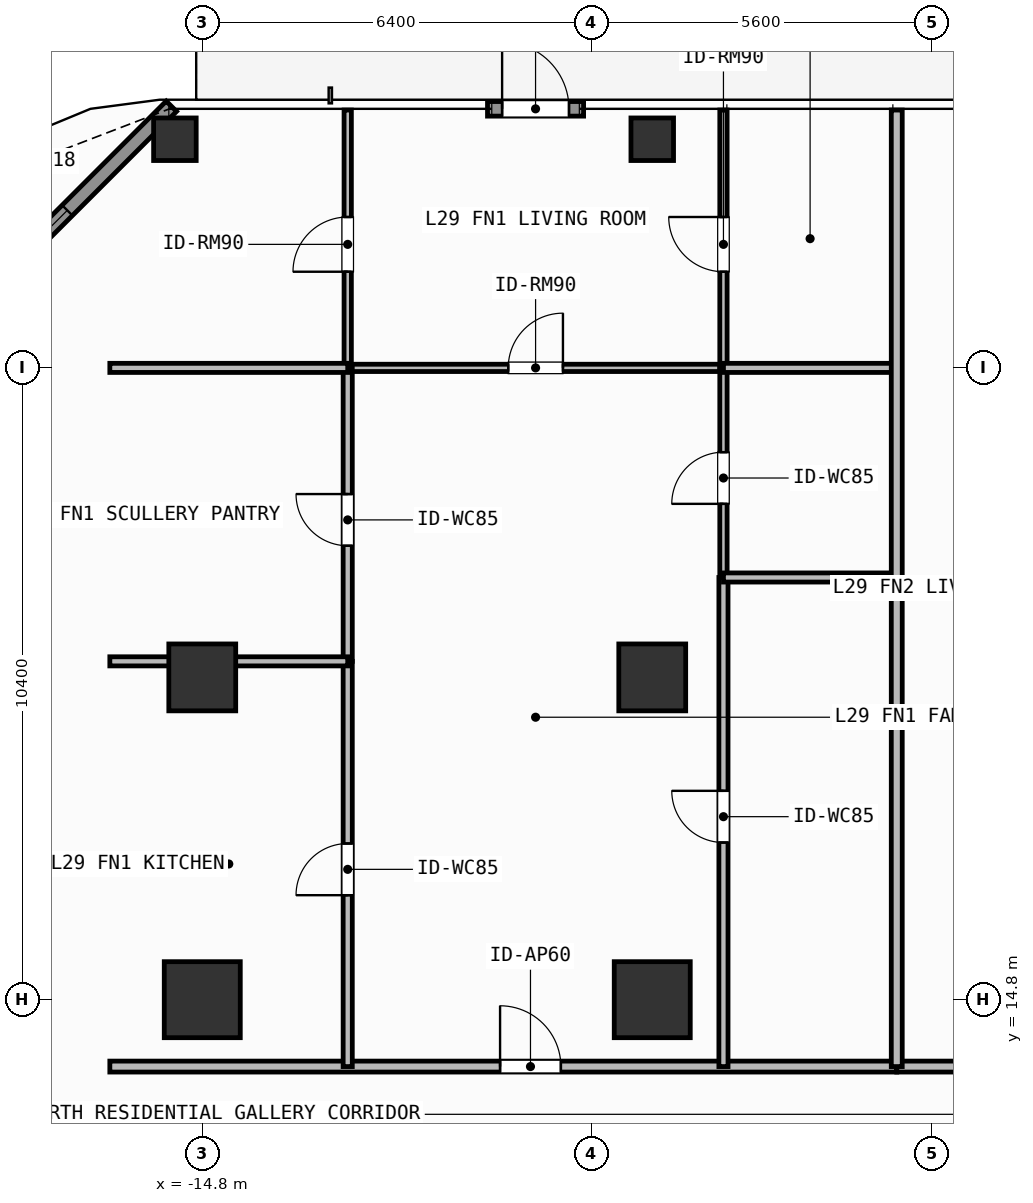
"""IFC4 building model, lengths in metres.
Left out: names, types, materials, properties, quantities, classifications, styles, units other than length and angle.
Written with IfcOpenShell. Run it as: python <this file> out.ifc"""

import sys

from ifc_helpers import new_model, si_unit, direction, frame, frame_2d, origin, origin_2d, place, context, subcontext, project, spatial, rectangle, hollow_rectangle, extrude, element, fill, save


model = new_model("IFC4")
c1 = context("Model", 3, precision=1e-05, world=origin(), true_north=direction((0.0, 1.0)))
c2 = subcontext(c1, "Body", "Model", "MODEL_VIEW")
j1 = project(units=[si_unit("LENGTHUNIT", "METRE"), si_unit("PLANEANGLEUNIT", "RADIAN")], contexts=[c1])
p1 = place(None, origin())
s1 = spatial("IfcSite", under=j1, at=p1, CompositionType="ELEMENT")
p2 = place(p1, origin())
s2 = spatial("IfcBuilding", under=s1, at=p2, CompositionType="ELEMENT")
p3 = place(p2, frame((0.0, 0.0, 117.3)))
s3 = spatial("IfcBuildingStorey", under=s2, at=p3, CompositionType="ELEMENT", Elevation=117.3)
for number, where, z_axis, x_axis in (
    (1, (-14.8, 14.8, 0.0), (0.0, 0.0, 1.0), (1.0, 0.0, 0.0)),
    (2, (-7.4, 14.8, 0.0), (0.0, 0.0, 1.0), (1.0, 0.0, 0.0)),
):
    element("IfcColumn", number, at=place(p3, frame(where, z_axis=z_axis, x_axis=x_axis)), inside=s3, PredefinedType="COLUMN", context=c2, shape_type="SweptSolid", body=[
        extrude(rectangle(XDim=1.25, YDim=1.25, at=origin_2d()), origin(), (0.0, 0.0, 1.0), 3.9),
    ])
for number, where, z_axis, x_axis in (
    (3, (-14.8, 20.1, 0.0), (0.0, 0.0, 1.0), (1.0, 0.0, 0.0)),
    (4, (-7.4, 20.1, 0.0), (0.0, 0.0, 1.0), (1.0, 0.0, 0.0)),
):
    element("IfcColumn", number, at=place(p3, frame(where, z_axis=z_axis, x_axis=x_axis)), inside=s3, PredefinedType="COLUMN", context=c2, shape_type="SweptSolid", body=[
        extrude(rectangle(XDim=1.1, YDim=1.1, at=origin_2d()), origin(), (0.0, 0.0, 1.0), 3.9),
    ])
for number, where, z_axis, x_axis in (
    (5, (-15.25, 28.95, 0.0), (0.0, 0.0, 1.0), (1.0, 0.0, 0.0)),
    (6, (-7.4, 28.95, 0.0), (0.0, 0.0, 1.0), (1.0, 0.0, 0.0)),
):
    element("IfcColumn", number, at=place(p3, frame(where, z_axis=z_axis, x_axis=x_axis)), inside=s3, PredefinedType="COLUMN", context=c2, shape_type="SweptSolid", body=[
        extrude(hollow_rectangle(XDim=0.7, YDim=0.7, WallThickness=0.032, at=origin_2d()), origin(), (0.0, 0.0, 1.0), 3.9),
    ])
p4 = place(p3, frame((-10.109, 29.45, 0.0), z_axis=(0.0, 0.0, 1.0), x_axis=(1.0, 0.0, 0.0)))
e7 = element("IfcWall", 7, at=p4, inside=s3, PredefinedType="SOLIDWALL", context=c2, shape_type="SweptSolid", body=[
    extrude(rectangle(XDim=1.58, YDim=0.24, at=frame_2d((0.79, 0.0))), origin(), (0.0, 0.0, 1.0), 3.68),
])
p5 = place(p4, frame((0.24, 0.0, 0.0)))
e8 = element("IfcOpeningElement", 8, at=p5, cuts=e7, PredefinedType="OPENING", context=c2, shape_type="SweptSolid", body=[
    extrude(rectangle(XDim=1.1, YDim=2.2, at=frame_2d((0.55, 1.1))), frame((0.0, 0.13, 0.0), z_axis=(0.0, -1.0, 0.0), x_axis=(1.0, 0.0, 0.0)), (0.0, 0.0, 1.0), 0.26),
])
p6 = place(p3, frame((-19.792, 25.008, 0.0), z_axis=(0.0, 0.0, 1.0), x_axis=(0.707106781187, 0.707106781187, 0.0)))
e9 = element("IfcWall", 9, at=p6, inside=s3, PredefinedType="SOLIDWALL", context=c2, shape_type="SweptSolid", body=[
    extrude(rectangle(XDim=6.343, YDim=0.24, at=frame_2d((3.171, 0.0))), origin(), (0.0, 0.0, 1.0), 3.68),
])
p7 = place(p6, frame((2.421, 0.0, 0.8)))
e10 = element("IfcOpeningElement", 10, at=p7, cuts=e9, PredefinedType="OPENING", context=c2, shape_type="SweptSolid", body=[
    extrude(rectangle(XDim=1.5, YDim=1.85, at=frame_2d((0.75, 0.925))), frame((0.0, 0.13, 0.0), z_axis=(0.0, -1.0, 0.0), x_axis=(1.0, 0.0, 0.0)), (0.0, 0.0, 1.0), 0.26),
])
p8 = place(p3, frame((-16.32, 13.7, 0.0), z_axis=(0.0, 0.0, 1.0), x_axis=(1.0, 0.0, 0.0)))
e11 = element("IfcWall", 11, at=p8, inside=s3, PredefinedType="PARTITIONING", context=c2, shape_type="SweptSolid", body=[
    extrude(rectangle(XDim=12.941, YDim=0.18, at=frame_2d((6.471, 0.0))), origin(), (0.0, 0.0, 1.0), 3.68),
])
p9 = place(p8, frame((6.417, 0.0, 0.0)))
e12 = element("IfcOpeningElement", 12, at=p9, cuts=e11, PredefinedType="OPENING", context=c2, shape_type="SweptSolid", body=[
    extrude(rectangle(XDim=1.0, YDim=2.2, at=frame_2d((0.5, 1.1))), frame((0.0, 0.1, 0.0), z_axis=(0.0, -1.0, 0.0), x_axis=(1.0, 0.0, 0.0)), (0.0, 0.0, 1.0), 0.2),
])
p10 = place(p3, frame((-12.408, 25.19, 0.0), z_axis=(0.0, 0.0, 1.0), x_axis=(1.0, 0.0, 0.0)))
e13 = element("IfcWall", 13, at=p10, inside=s3, PredefinedType="PARTITIONING", context=c2, shape_type="SweptSolid", body=[
    extrude(rectangle(XDim=6.179, YDim=0.12, at=frame_2d((3.089, 0.0))), origin(), (0.0, 0.0, 1.0), 3.68),
])
p11 = place(p10, frame((2.639, 0.0, 0.0)))
e14 = element("IfcOpeningElement", 14, at=p11, cuts=e13, PredefinedType="OPENING", context=c2, shape_type="SweptSolid", body=[
    extrude(rectangle(XDim=0.9, YDim=2.1, at=frame_2d((0.45, 1.05))), frame((0.0, 0.07, 0.0), z_axis=(0.0, -1.0, 0.0), x_axis=(1.0, 0.0, 0.0)), (0.0, 0.0, 1.0), 0.14),
])
p12 = place(p3, frame((-12.408, 13.7, 0.0), z_axis=(0.0, 0.0, 1.0), x_axis=(0.0, 1.0, 0.0)))
e15 = element("IfcWall", 15, at=p12, inside=s3, PredefinedType="PARTITIONING", context=c2, shape_type="SweptSolid", body=[
    extrude(rectangle(XDim=6.664, YDim=0.15, at=frame_2d((3.332, 0.0))), origin(), (0.0, 0.0, 1.0), 3.68),
])
p13 = place(p12, frame((2.818, 0.0, 0.0)))
e16 = element("IfcOpeningElement", 16, at=p13, cuts=e15, PredefinedType="OPENING", context=c2, shape_type="SweptSolid", body=[
    extrude(rectangle(XDim=0.85, YDim=2.1, at=frame_2d((0.425, 1.05))), frame((0.0, 0.085, 0.0), z_axis=(0.0, -1.0, 0.0), x_axis=(1.0, 0.0, 0.0)), (0.0, 0.0, 1.0), 0.17),
])
p14 = place(p3, frame((-12.408, 20.364, 0.0), z_axis=(0.0, 0.0, 1.0), x_axis=(0.0, 1.0, 0.0)))
e17 = element("IfcWall", 17, at=p14, inside=s3, PredefinedType="PARTITIONING", context=c2, shape_type="SweptSolid", body=[
    extrude(rectangle(XDim=4.826, YDim=0.15, at=frame_2d((2.413, 0.0))), origin(), (0.0, 0.0, 1.0), 3.68),
])
p15 = place(p14, frame((1.901, 0.0, 0.0)))
e18 = element("IfcOpeningElement", 18, at=p15, cuts=e17, PredefinedType="OPENING", context=c2, shape_type="SweptSolid", body=[
    extrude(rectangle(XDim=0.85, YDim=2.1, at=frame_2d((0.425, 1.05))), frame((0.0, 0.085, 0.0), z_axis=(0.0, -1.0, 0.0), x_axis=(1.0, 0.0, 0.0)), (0.0, 0.0, 1.0), 0.17),
])
p16 = place(p3, frame((-12.408, 25.19, 0.0), z_axis=(0.0, 0.0, 1.0), x_axis=(0.0, 1.0, 0.0)))
e19 = element("IfcWall", 19, at=p16, inside=s3, PredefinedType="PARTITIONING", context=c2, shape_type="SweptSolid", body=[
    extrude(rectangle(XDim=4.24, YDim=0.12, at=frame_2d((2.12, 0.0))), origin(), (0.0, 0.0, 1.0), 3.68),
])
p17 = place(p16, frame((1.581, 0.0, 0.0)))
e20 = element("IfcOpeningElement", 20, at=p17, cuts=e19, PredefinedType="OPENING", context=c2, shape_type="SweptSolid", body=[
    extrude(rectangle(XDim=0.9, YDim=2.1, at=frame_2d((0.45, 1.05))), frame((0.0, 0.07, 0.0), z_axis=(0.0, -1.0, 0.0), x_axis=(1.0, 0.0, 0.0)), (0.0, 0.0, 1.0), 0.14),
])
p18 = place(p3, frame((-6.229, 13.7, 0.0), z_axis=(0.0, 0.0, 1.0), x_axis=(0.0, 1.0, 0.0)))
e21 = element("IfcWall", 21, at=p18, inside=s3, PredefinedType="PARTITIONING", context=c2, shape_type="SweptSolid", body=[
    extrude(rectangle(XDim=8.043, YDim=0.15, at=frame_2d((4.021, 0.0))), origin(), (0.0, 0.0, 1.0), 3.68),
])
p19 = place(p18, frame((3.685, 0.0, 0.0)))
e22 = element("IfcOpeningElement", 22, at=p19, cuts=e21, PredefinedType="OPENING", context=c2, shape_type="SweptSolid", body=[
    extrude(rectangle(XDim=0.85, YDim=2.1, at=frame_2d((0.425, 1.05))), frame((0.0, 0.085, 0.0), z_axis=(0.0, -1.0, 0.0), x_axis=(1.0, 0.0, 0.0)), (0.0, 0.0, 1.0), 0.17),
])
p20 = place(p3, frame((-6.229, 21.743, 0.0), z_axis=(0.0, 0.0, 1.0), x_axis=(0.0, 1.0, 0.0)))
e23 = element("IfcWall", 23, at=p20, inside=s3, PredefinedType="PARTITIONING", context=c2, shape_type="SweptSolid", body=[
    extrude(rectangle(XDim=3.447, YDim=0.12, at=frame_2d((1.724, 0.0))), origin(), (0.0, 0.0, 1.0), 3.68),
])
p21 = place(p20, frame((1.211, 0.0, 0.0)))
e24 = element("IfcOpeningElement", 24, at=p21, cuts=e23, PredefinedType="OPENING", context=c2, shape_type="SweptSolid", body=[
    extrude(rectangle(XDim=0.85, YDim=2.1, at=frame_2d((0.425, 1.05))), frame((0.0, 0.07, 0.0), z_axis=(0.0, -1.0, 0.0), x_axis=(1.0, 0.0, 0.0)), (0.0, 0.0, 1.0), 0.14),
])
p22 = place(p3, frame((-6.229, 25.19, 0.0), z_axis=(0.0, 0.0, 1.0), x_axis=(0.0, 1.0, 0.0)))
e25 = element("IfcWall", 25, at=p22, inside=s3, PredefinedType="PARTITIONING", context=c2, shape_type="SweptSolid", body=[
    extrude(rectangle(XDim=4.24, YDim=0.12, at=frame_2d((2.12, 0.0))), origin(), (0.0, 0.0, 1.0), 3.68),
])
p23 = place(p22, frame((1.581, 0.0, 0.0)))
e26 = element("IfcOpeningElement", 26, at=p23, cuts=e25, PredefinedType="OPENING", context=c2, shape_type="SweptSolid", body=[
    extrude(rectangle(XDim=0.9, YDim=2.1, at=frame_2d((0.45, 1.05))), frame((0.0, 0.07, 0.0), z_axis=(0.0, -1.0, 0.0), x_axis=(1.0, 0.0, 0.0)), (0.0, 0.0, 1.0), 0.14),
])
p24 = place(p3, frame((-3.379, 13.7, 0.0), z_axis=(0.0, 0.0, 1.0), x_axis=(1.0, 0.0, 0.0)))
e27 = element("IfcWall", 27, at=p24, inside=s3, PredefinedType="PARTITIONING", context=c2, shape_type="SweptSolid", body=[
    extrude(rectangle(XDim=7.279, YDim=0.18, at=frame_2d((3.639, 0.0))), origin(), (0.0, 0.0, 1.0), 3.68),
])
p25 = place(p24, frame((1.562, 0.0, 0.0)))
e28 = element("IfcOpeningElement", 28, at=p25, cuts=e27, PredefinedType="OPENING", context=c2, shape_type="SweptSolid", body=[
    extrude(rectangle(XDim=1.0, YDim=2.2, at=frame_2d((0.5, 1.1))), frame((0.0, 0.1, 0.0), z_axis=(0.0, -1.0, 0.0), x_axis=(1.0, 0.0, 0.0)), (0.0, 0.0, 1.0), 0.2),
])
p26 = place(p3, frame((-16.32, 20.364, 0.0), z_axis=(0.0, 0.0, 1.0), x_axis=(1.0, 0.0, 0.0)))
e29 = element("IfcWall", 29, at=p26, inside=s3, PredefinedType="PARTITIONING", context=c2, shape_type="SweptSolid", body=[
    extrude(rectangle(XDim=3.912, YDim=0.15, at=frame_2d((1.956, 0.0))), origin(), (0.0, 0.0, 1.0), 3.082),
])
p27 = place(p3, frame((-16.32, 25.19, 0.0), z_axis=(0.0, 0.0, 1.0), x_axis=(1.0, 0.0, 0.0)))
e30 = element("IfcWall", 30, at=p27, inside=s3, PredefinedType="PARTITIONING", context=c2, shape_type="SweptSolid", body=[
    extrude(rectangle(XDim=3.912, YDim=0.15, at=frame_2d((1.956, 0.0))), origin(), (0.0, 0.0, 1.0), 3.68),
])
for number, where, z_axis, x_axis in (
    (31, (-6.229, 21.743, 0.0), (0.0, 0.0, 1.0), (1.0, 0.0, 0.0)),
    (32, (-6.229, 25.19, 0.0), (0.0, 0.0, 1.0), (1.0, 0.0, 0.0)),
):
    element("IfcWall", number, at=place(p3, frame(where, z_axis=z_axis, x_axis=x_axis)), inside=s3, PredefinedType="PARTITIONING", context=c2, shape_type="SweptSolid", body=[
        extrude(rectangle(XDim=2.85, YDim=0.15, at=frame_2d((1.425, 0.0))), origin(), (0.0, 0.0, 1.0), 3.68),
    ])
p28 = place(p3, frame((-3.379, 13.7, 0.0), z_axis=(0.0, 0.0, 1.0), x_axis=(0.0, 1.0, 0.0)))
e33 = element("IfcWall", 33, at=p28, inside=s3, PredefinedType="PARTITIONING", context=c2, shape_type="SweptSolid", body=[
    extrude(rectangle(XDim=15.73, YDim=0.18, at=frame_2d((7.865, 0.0))), origin(), (0.0, 0.0, 1.0), 3.68),
])
p29 = place(p5, origin())
e34 = element("IfcDoor", 34, at=p29, inside=s3, OperationType="SINGLE_SWING_LEFT", PredefinedType="DOOR", context=c2, shape_type="SweptSolid", body=[
    extrude(rectangle(XDim=1.1, YDim=2.2, at=frame_2d((0.55, 1.1))), frame((0.0, 0.025, 0.0), z_axis=(0.0, -1.0, 0.0), x_axis=(1.0, 0.0, 0.0)), (0.0, 0.0, 1.0), 0.05),
])
fill(e8, e34)
p30 = place(p7, origin())
e35 = element("IfcWindow", 35, at=p30, inside=s3, PartitioningType="SINGLE_PANEL", PredefinedType="WINDOW", context=c2, shape_type="SweptSolid", body=[
    extrude(rectangle(XDim=1.5, YDim=1.85, at=frame_2d((0.75, 0.925))), frame((0.0, 0.03, 0.0), z_axis=(0.0, -1.0, 0.0), x_axis=(1.0, 0.0, 0.0)), (0.0, 0.0, 1.0), 0.06),
])
fill(e10, e35)
p31 = place(p9, origin())
e36 = element("IfcDoor", 36, at=p31, inside=s3, OperationType="SINGLE_SWING_LEFT", PredefinedType="DOOR", context=c2, shape_type="SweptSolid", body=[
    extrude(rectangle(XDim=1.0, YDim=2.2, at=frame_2d((0.5, 1.1))), frame((0.0, 0.025, 0.0), z_axis=(0.0, -1.0, 0.0), x_axis=(1.0, 0.0, 0.0)), (0.0, 0.0, 1.0), 0.05),
])
fill(e12, e36)
p32 = place(p11, origin())
e37 = element("IfcDoor", 37, at=p32, inside=s3, OperationType="SINGLE_SWING_RIGHT", PredefinedType="DOOR", context=c2, shape_type="SweptSolid", body=[
    extrude(rectangle(XDim=0.9, YDim=2.1, at=frame_2d((0.45, 1.05))), frame((0.0, 0.025, 0.0), z_axis=(0.0, -1.0, 0.0), x_axis=(1.0, 0.0, 0.0)), (0.0, 0.0, 1.0), 0.05),
])
fill(e14, e37)
p33 = place(p13, origin())
e38 = element("IfcDoor", 38, at=p33, inside=s3, OperationType="SINGLE_SWING_LEFT", PredefinedType="DOOR", context=c2, shape_type="SweptSolid", body=[
    extrude(rectangle(XDim=0.85, YDim=2.1, at=frame_2d((0.425, 1.05))), frame((0.0, 0.025, 0.0), z_axis=(0.0, -1.0, 0.0), x_axis=(1.0, 0.0, 0.0)), (0.0, 0.0, 1.0), 0.05),
])
fill(e16, e38)
p34 = place(p15, origin())
e39 = element("IfcDoor", 39, at=p34, inside=s3, OperationType="SINGLE_SWING_RIGHT", PredefinedType="DOOR", context=c2, shape_type="SweptSolid", body=[
    extrude(rectangle(XDim=0.85, YDim=2.1, at=frame_2d((0.425, 1.05))), frame((0.0, 0.025, 0.0), z_axis=(0.0, -1.0, 0.0), x_axis=(1.0, 0.0, 0.0)), (0.0, 0.0, 1.0), 0.05),
])
fill(e18, e39)
p35 = place(p17, origin())
e40 = element("IfcDoor", 40, at=p35, inside=s3, OperationType="SINGLE_SWING_LEFT", PredefinedType="DOOR", context=c2, shape_type="SweptSolid", body=[
    extrude(rectangle(XDim=0.9, YDim=2.1, at=frame_2d((0.45, 1.05))), frame((0.0, 0.025, 0.0), z_axis=(0.0, -1.0, 0.0), x_axis=(1.0, 0.0, 0.0)), (0.0, 0.0, 1.0), 0.05),
])
fill(e20, e40)
p36 = place(p19, origin())
e41 = element("IfcDoor", 41, at=p36, inside=s3, OperationType="SINGLE_SWING_RIGHT", PredefinedType="DOOR", context=c2, shape_type="SweptSolid", body=[
    extrude(rectangle(XDim=0.85, YDim=2.1, at=frame_2d((0.425, 1.05))), frame((0.0, 0.025, 0.0), z_axis=(0.0, -1.0, 0.0), x_axis=(1.0, 0.0, 0.0)), (0.0, 0.0, 1.0), 0.05),
])
fill(e22, e41)
p37 = place(p21, origin())
e42 = element("IfcDoor", 42, at=p37, inside=s3, OperationType="SINGLE_SWING_LEFT", PredefinedType="DOOR", context=c2, shape_type="SweptSolid", body=[
    extrude(rectangle(XDim=0.85, YDim=2.1, at=frame_2d((0.425, 1.05))), frame((0.0, 0.025, 0.0), z_axis=(0.0, -1.0, 0.0), x_axis=(1.0, 0.0, 0.0)), (0.0, 0.0, 1.0), 0.05),
])
fill(e24, e42)
p38 = place(p23, origin())
e43 = element("IfcDoor", 43, at=p38, inside=s3, OperationType="SINGLE_SWING_RIGHT", PredefinedType="DOOR", context=c2, shape_type="SweptSolid", body=[
    extrude(rectangle(XDim=0.9, YDim=2.1, at=frame_2d((0.45, 1.05))), frame((0.0, 0.025, 0.0), z_axis=(0.0, -1.0, 0.0), x_axis=(1.0, 0.0, 0.0)), (0.0, 0.0, 1.0), 0.05),
])
fill(e26, e43)
save(model, sys.argv[1])
